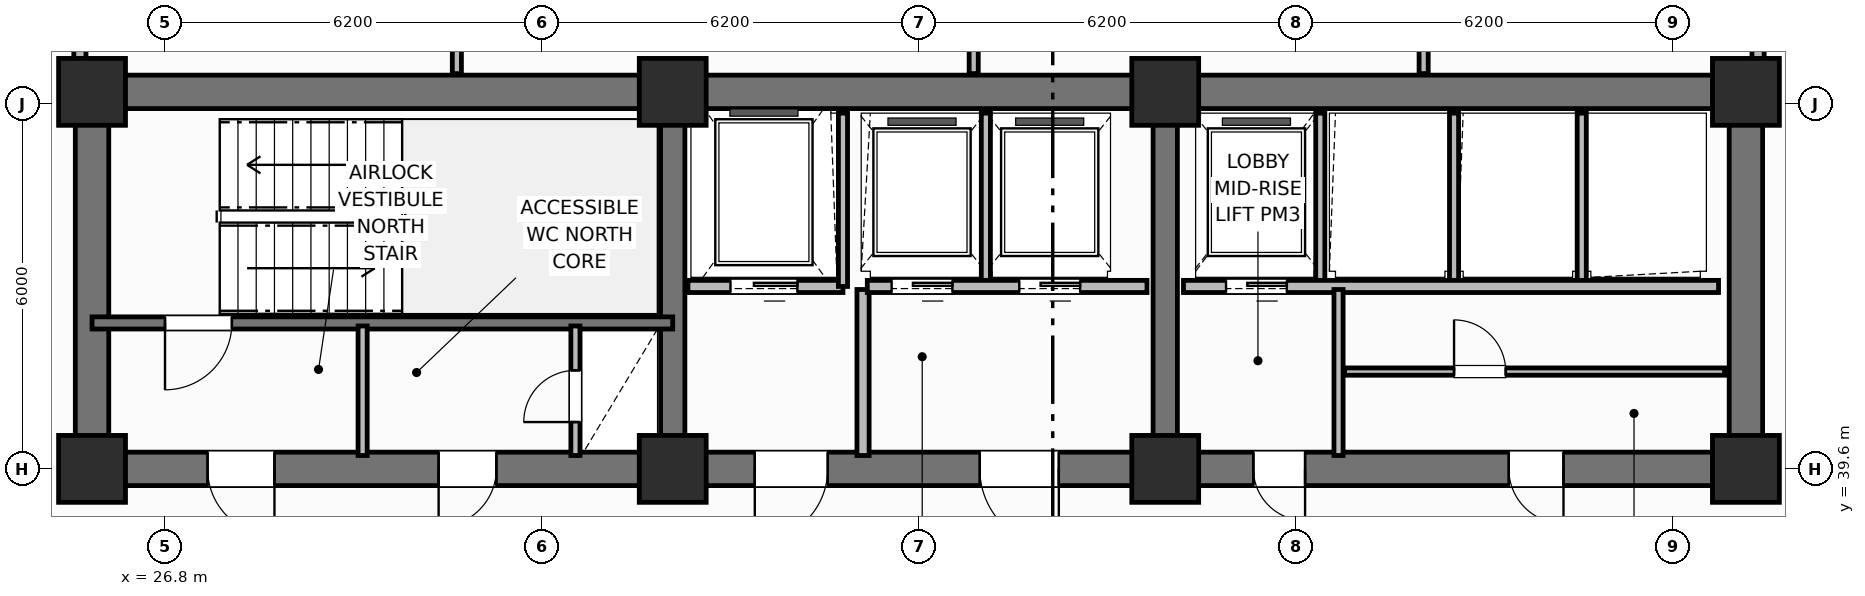
"""IFC4 building model, lengths in metres.
Left out: names, types, materials, properties, quantities, classifications, styles, units other than length and angle.
Written with IfcOpenShell. Run it as: python <this file> out.ifc"""

import sys

from ifc_helpers import new_model, si_unit, direction, frame, frame_2d, origin, origin_2d, place, context, subcontext, project, spatial, rectangle, extrude, element, fill, save


model = new_model("IFC4")
c1 = context("Model", 3, precision=1e-05, world=origin(), true_north=direction((0.0, 1.0)))
c2 = subcontext(c1, "Body", "Model", "MODEL_VIEW")
j1 = project(units=[si_unit("LENGTHUNIT", "METRE"), si_unit("PLANEANGLEUNIT", "RADIAN")], contexts=[c1])
p1 = place(None, origin())
s1 = spatial("IfcSite", under=j1, at=p1, CompositionType="ELEMENT")
p2 = place(p1, origin())
s2 = spatial("IfcBuilding", under=s1, at=p2, CompositionType="ELEMENT")
p3 = place(p2, frame((0.0, 0.0, 114.2)))
s3 = spatial("IfcBuildingStorey", under=s2, at=p3, CompositionType="ELEMENT", Elevation=114.2)
p4 = place(p3, frame((25.6, 45.8, 0.0), z_axis=(0.0, 0.0, 1.0), x_axis=(1.0, 0.0, 0.0)))
e1 = element("IfcWall", 1, at=p4, inside=s3, PredefinedType="SHEAR", context=c2, shape_type="SweptSolid", body=[
    extrude(rectangle(XDim=27.2, YDim=0.55, at=frame_2d((13.6, 0.0))), origin(), (0.0, 0.0, 1.0), 3.7),
])
for number, where, z_axis, x_axis in (
    (2, (25.6, 39.875, 0.0), (0.0, 0.0, 1.0), (0.0, 1.0, 0.0)),
    (3, (52.8, 39.875, 0.0), (0.0, 0.0, 1.0), (0.0, 1.0, 0.0)),
):
    element("IfcWall", number, at=place(p3, frame(where, z_axis=z_axis, x_axis=x_axis)), inside=s3, PredefinedType="SHEAR", context=c2, shape_type="SweptSolid", body=[
        extrude(rectangle(XDim=5.65, YDim=0.55, at=frame_2d((2.825, 0.0))), origin(), (0.0, 0.0, 1.0), 3.7),
    ])
p5 = place(p3, frame((52.8, 39.6, 0.0), z_axis=(0.0, 0.0, 1.0), x_axis=(-1.0, 0.0, 0.0)))
e4 = element("IfcWall", 4, at=p5, inside=s3, PredefinedType="SHEAR", context=c2, shape_type="SweptSolid", body=[
    extrude(rectangle(XDim=27.2, YDim=0.55, at=frame_2d((13.6, 0.0))), origin(), (0.0, 0.0, 1.0), 3.7),
])
p6 = place(p5, frame((24.2, 0.0, 0.0)))
e5 = element("IfcOpeningElement", 5, at=p6, cuts=e4, PredefinedType="OPENING", context=c2, shape_type="SweptSolid", body=[
    extrude(rectangle(XDim=1.1, YDim=2.15, at=frame_2d((0.55, 1.075))), frame((0.0, 0.285, 0.0), z_axis=(0.0, -1.0, 0.0), x_axis=(1.0, 0.0, 0.0)), (0.0, 0.0, 1.0), 0.57),
])
p7 = place(p5, frame((20.55, 0.0, 0.0)))
e6 = element("IfcOpeningElement", 6, at=p7, cuts=e4, PredefinedType="OPENING", context=c2, shape_type="SweptSolid", body=[
    extrude(rectangle(XDim=0.95, YDim=2.1, at=frame_2d((0.475, 1.05))), frame((0.0, 0.285, 0.0), z_axis=(0.0, -1.0, 0.0), x_axis=(1.0, 0.0, 0.0)), (0.0, 0.0, 1.0), 0.57),
])
p8 = place(p5, frame((15.1, 0.0, 0.0)))
e7 = element("IfcOpeningElement", 7, at=p8, cuts=e4, PredefinedType="OPENING", context=c2, shape_type="SweptSolid", body=[
    extrude(rectangle(XDim=1.2, YDim=2.15, at=frame_2d((0.6, 1.075))), frame((0.0, 0.285, 0.0), z_axis=(0.0, -1.0, 0.0), x_axis=(1.0, 0.0, 0.0)), (0.0, 0.0, 1.0), 0.57),
])
p9 = place(p5, frame((11.3, 0.0, 0.0)))
e8 = element("IfcOpeningElement", 8, at=p9, cuts=e4, PredefinedType="OPENING", context=c2, shape_type="SweptSolid", body=[
    extrude(rectangle(XDim=1.3, YDim=2.2, at=frame_2d((0.65, 1.1))), frame((0.0, 0.285, 0.0), z_axis=(0.0, -1.0, 0.0), x_axis=(1.0, 0.0, 0.0)), (0.0, 0.0, 1.0), 0.57),
])
p10 = place(p5, frame((7.25, 0.0, 0.0)))
e9 = element("IfcOpeningElement", 9, at=p10, cuts=e4, PredefinedType="OPENING", context=c2, shape_type="SweptSolid", body=[
    extrude(rectangle(XDim=0.85, YDim=2.1, at=frame_2d((0.425, 1.05))), frame((0.0, 0.285, 0.0), z_axis=(0.0, -1.0, 0.0), x_axis=(1.0, 0.0, 0.0)), (0.0, 0.0, 1.0), 0.57),
])
p11 = place(p5, frame((3.0, 0.0, 0.0)))
e10 = element("IfcOpeningElement", 10, at=p11, cuts=e4, PredefinedType="OPENING", context=c2, shape_type="SweptSolid", body=[
    extrude(rectangle(XDim=0.9, YDim=2.1, at=frame_2d((0.45, 1.05))), frame((0.0, 0.285, 0.0), z_axis=(0.0, -1.0, 0.0), x_axis=(1.0, 0.0, 0.0)), (0.0, 0.0, 1.0), 0.57),
])
for number, where, z_axis, x_axis in (
    (11, (35.15, 39.875, 0.0), (0.0, 0.0, 1.0), (0.0, 1.0, 0.0)),
    (12, (43.25, 39.875, 0.0), (0.0, 0.0, 1.0), (0.0, 1.0, 0.0)),
):
    element("IfcWall", number, at=place(p3, frame(where, z_axis=z_axis, x_axis=x_axis)), inside=s3, PredefinedType="SHEAR", context=c2, shape_type="SweptSolid", body=[
        extrude(rectangle(XDim=5.65, YDim=0.4, at=frame_2d((2.825, 0.0))), origin(), (0.0, 0.0, 1.0), 3.7),
    ])
for number, where, z_axis, x_axis in (
    (13, (25.6, 39.6, 0.0), (0.0, 0.0, 1.0), (1.0, 0.0, 0.0)),
    (14, (25.6, 45.8, 0.0), (0.0, 0.0, 1.0), (1.0, 0.0, 0.0)),
    (15, (35.15, 39.6, 0.0), (0.0, 0.0, 1.0), (1.0, 0.0, 0.0)),
    (16, (35.15, 45.8, 0.0), (0.0, 0.0, 1.0), (1.0, 0.0, 0.0)),
    (17, (43.25, 39.6, 0.0), (0.0, 0.0, 1.0), (1.0, 0.0, 0.0)),
    (18, (43.25, 45.8, 0.0), (0.0, 0.0, 1.0), (1.0, 0.0, 0.0)),
    (19, (52.8, 39.6, 0.0), (0.0, 0.0, 1.0), (1.0, 0.0, 0.0)),
    (20, (52.8, 45.8, 0.0), (0.0, 0.0, 1.0), (1.0, 0.0, 0.0)),
):
    element("IfcColumn", number, at=place(p3, frame(where, z_axis=z_axis, x_axis=x_axis)), inside=s3, PredefinedType="COLUMN", context=c2, shape_type="SweptSolid", body=[
        extrude(rectangle(XDim=1.1, YDim=1.1, at=origin_2d()), origin(), (0.0, 0.0, 1.0), 3.7),
    ])
p12 = place(p3, frame((35.15, 42.0, 0.0), z_axis=(0.0, 0.0, 1.0), x_axis=(-1.0, 0.0, 0.0)))
e21 = element("IfcWall", 21, at=p12, inside=s3, PredefinedType="SHEAR", context=c2, shape_type="SweptSolid", body=[
    extrude(rectangle(XDim=9.55, YDim=0.2, at=frame_2d((4.775, 0.0))), origin(), (0.0, 0.0, 1.0), 3.7),
])
p13 = place(p12, frame((7.25, 0.0, 0.0)))
e22 = element("IfcOpeningElement", 22, at=p13, cuts=e21, PredefinedType="OPENING", context=c2, shape_type="SweptSolid", body=[
    extrude(rectangle(XDim=1.1, YDim=2.15, at=frame_2d((0.55, 1.075))), frame((0.0, 0.11, 0.0), z_axis=(0.0, -1.0, 0.0), x_axis=(1.0, 0.0, 0.0)), (0.0, 0.0, 1.0), 0.22),
])
p14 = place(p3, frame((33.55, 39.82, 0.0), z_axis=(0.0, 0.0, 1.0), x_axis=(0.0, 1.0, 0.0)))
e23 = element("IfcWall", 23, at=p14, inside=s3, PredefinedType="PARTITIONING", context=c2, shape_type="SweptSolid", body=[
    extrude(rectangle(XDim=2.13, YDim=0.15, at=frame_2d((1.065, 0.0))), origin(), (0.0, 0.0, 1.0), 2.53),
])
p15 = place(p14, frame((0.55, 0.0, 0.0)))
e24 = element("IfcOpeningElement", 24, at=p15, cuts=e23, PredefinedType="OPENING", context=c2, shape_type="SweptSolid", body=[
    extrude(rectangle(XDim=0.85, YDim=2.05, at=frame_2d((0.425, 1.025))), frame((0.0, 0.085, 0.0), z_axis=(0.0, -1.0, 0.0), x_axis=(1.0, 0.0, 0.0)), (0.0, 0.0, 1.0), 0.17),
])
p16 = place(p3, frame((30.05, 39.82, 0.0), z_axis=(0.0, 0.0, 1.0), x_axis=(0.0, 1.0, 0.0)))
e25 = element("IfcWall", 25, at=p16, inside=s3, PredefinedType="PARTITIONING", context=c2, shape_type="SweptSolid", body=[
    extrude(rectangle(XDim=2.13, YDim=0.15, at=frame_2d((1.065, 0.0))), origin(), (0.0, 0.0, 1.0), 2.53),
])
p17 = place(p3, frame((37.95, 42.6, 0.0), z_axis=(0.0, 0.0, 1.0), x_axis=(-1.0, 0.0, 0.0)))
e26 = element("IfcWall", 26, at=p17, inside=s3, PredefinedType="PARTITIONING", context=c2, shape_type="SweptSolid", body=[
    extrude(rectangle(XDim=2.55, YDim=0.2, at=frame_2d((1.275, 0.0))), origin(), (0.0, 0.0, 1.0), 2.3),
])
p18 = place(p17, frame((0.75, 0.0, 0.0)))
e27 = element("IfcOpeningElement", 27, at=p18, cuts=e26, PredefinedType="OPENING", context=c2, shape_type="SweptSolid", body=[
    extrude(rectangle(XDim=1.1, YDim=2.15, at=frame_2d((0.55, 1.075))), frame((0.0, 0.11, 0.0), z_axis=(0.0, -1.0, 0.0), x_axis=(1.0, 0.0, 0.0)), (0.0, 0.0, 1.0), 0.22),
])
p19 = place(p3, frame((37.95, 42.6, 0.0), z_axis=(0.0, 0.0, 1.0), x_axis=(0.0, 1.0, 0.0)))
e28 = element("IfcWall", 28, at=p19, inside=s3, PredefinedType="PARTITIONING", context=c2, shape_type="SweptSolid", body=[
    extrude(rectangle(XDim=2.85, YDim=0.15, at=frame_2d((1.425, 0.0))), origin(), (0.0, 0.0, 1.0), 2.53),
])
p20 = place(p3, frame((38.28, 39.82, 0.0), z_axis=(0.0, 0.0, 1.0), x_axis=(0.0, 1.0, 0.0)))
e29 = element("IfcWall", 29, at=p20, inside=s3, PredefinedType="PARTITIONING", context=c2, shape_type="SweptSolid", body=[
    extrude(rectangle(XDim=2.73, YDim=0.2, at=frame_2d((1.365, 0.0))), origin(), (0.0, 0.0, 1.0), 2.53),
])
p21 = place(p3, frame((40.3, 42.65, 0.0), z_axis=(0.0, 0.0, 1.0), x_axis=(0.0, 1.0, 0.0)))
e30 = element("IfcWall", 30, at=p21, inside=s3, PredefinedType="PARTITIONING", context=c2, shape_type="SweptSolid", body=[
    extrude(rectangle(XDim=2.8, YDim=0.15, at=frame_2d((1.4, 0.0))), origin(), (0.0, 0.0, 1.0), 2.53),
])
p22 = place(p3, frame((42.95, 42.6, 0.0), z_axis=(0.0, 0.0, 1.0), x_axis=(-1.0, 0.0, 0.0)))
e31 = element("IfcWall", 31, at=p22, inside=s3, PredefinedType="PARTITIONING", context=c2, shape_type="SweptSolid", body=[
    extrude(rectangle(XDim=4.6, YDim=0.2, at=frame_2d((2.3, 0.0))), origin(), (0.0, 0.0, 1.0), 2.3),
])
p23 = place(p22, frame((3.2, 0.0, 0.0)))
e32 = element("IfcOpeningElement", 32, at=p23, cuts=e31, PredefinedType="OPENING", context=c2, shape_type="SweptSolid", body=[
    extrude(rectangle(XDim=1.0, YDim=2.15, at=frame_2d((0.5, 1.075))), frame((0.0, 0.11, 0.0), z_axis=(0.0, -1.0, 0.0), x_axis=(1.0, 0.0, 0.0)), (0.0, 0.0, 1.0), 0.22),
])
p24 = place(p22, frame((1.1, 0.0, 0.0)))
e33 = element("IfcOpeningElement", 33, at=p24, cuts=e31, PredefinedType="OPENING", context=c2, shape_type="SweptSolid", body=[
    extrude(rectangle(XDim=1.0, YDim=2.15, at=frame_2d((0.5, 1.075))), frame((0.0, 0.11, 0.0), z_axis=(0.0, -1.0, 0.0), x_axis=(1.0, 0.0, 0.0)), (0.0, 0.0, 1.0), 0.22),
])
for number, where, z_axis, x_axis in (
    (34, (45.8, 42.65, 0.0), (0.0, 0.0, 1.0), (0.0, 1.0, 0.0)),
    (35, (48.0, 42.65, 0.0), (0.0, 0.0, 1.0), (0.0, 1.0, 0.0)),
    (36, (50.1, 42.65, 0.0), (0.0, 0.0, 1.0), (0.0, 1.0, 0.0)),
):
    element("IfcWall", number, at=place(p3, frame(where, z_axis=z_axis, x_axis=x_axis)), inside=s3, PredefinedType="PARTITIONING", context=c2, shape_type="SweptSolid", body=[
        extrude(rectangle(XDim=2.8, YDim=0.15, at=frame_2d((1.4, 0.0))), origin(), (0.0, 0.0, 1.0), 2.53),
    ])
p25 = place(p3, frame((52.35, 42.6, 0.0), z_axis=(0.0, 0.0, 1.0), x_axis=(-1.0, 0.0, 0.0)))
e37 = element("IfcWall", 37, at=p25, inside=s3, PredefinedType="PARTITIONING", context=c2, shape_type="SweptSolid", body=[
    extrude(rectangle(XDim=8.8, YDim=0.2, at=frame_2d((4.4, 0.0))), origin(), (0.0, 0.0, 1.0), 2.53),
])
p26 = place(p25, frame((7.1, 0.0, 0.0)))
e38 = element("IfcOpeningElement", 38, at=p26, cuts=e37, PredefinedType="OPENING", context=c2, shape_type="SweptSolid", body=[
    extrude(rectangle(XDim=1.0, YDim=2.15, at=frame_2d((0.5, 1.075))), frame((0.0, 0.11, 0.0), z_axis=(0.0, -1.0, 0.0), x_axis=(1.0, 0.0, 0.0)), (0.0, 0.0, 1.0), 0.22),
])
p27 = place(p3, frame((46.1, 39.82, 0.0), z_axis=(0.0, 0.0, 1.0), x_axis=(0.0, 1.0, 0.0)))
e39 = element("IfcWall", 39, at=p27, inside=s3, PredefinedType="PARTITIONING", context=c2, shape_type="SweptSolid", body=[
    extrude(rectangle(XDim=2.73, YDim=0.15, at=frame_2d((1.365, 0.0))), origin(), (0.0, 0.0, 1.0), 2.53),
])
p28 = place(p3, frame((46.2, 41.2, 0.0), z_axis=(0.0, 0.0, 1.0), x_axis=(1.0, 0.0, 0.0)))
e40 = element("IfcWall", 40, at=p28, inside=s3, PredefinedType="PARTITIONING", context=c2, shape_type="SweptSolid", body=[
    extrude(rectangle(XDim=6.25, YDim=0.12, at=frame_2d((3.125, 0.0))), origin(), (0.0, 0.0, 1.0), 2.53),
])
p29 = place(p28, frame((1.8, 0.0, 0.0)))
e41 = element("IfcOpeningElement", 41, at=p29, cuts=e40, PredefinedType="OPENING", context=c2, shape_type="SweptSolid", body=[
    extrude(rectangle(XDim=0.85, YDim=2.1, at=frame_2d((0.425, 1.05))), frame((0.0, 0.07, 0.0), z_axis=(0.0, -1.0, 0.0), x_axis=(1.0, 0.0, 0.0)), (0.0, 0.0, 1.0), 0.14),
])
p30 = place(p3, frame((31.6, 46.1, 0.0), z_axis=(0.0, 0.0, 1.0), x_axis=(0.0, 1.0, 0.0)))
e42 = element("IfcWall", 42, at=p30, inside=s3, PredefinedType="PARTITIONING", context=c2, shape_type="SweptSolid", body=[
    extrude(rectangle(XDim=5.33, YDim=0.15, at=frame_2d((2.665, 0.0))), origin(), (0.0, 0.0, 1.0), 2.53),
])
p31 = place(p30, frame((0.85, 0.0, 0.0)))
e43 = element("IfcOpeningElement", 43, at=p31, cuts=e42, PredefinedType="OPENING", context=c2, shape_type="SweptSolid", body=[
    extrude(rectangle(XDim=0.9, YDim=2.1, at=frame_2d((0.45, 1.05))), frame((0.0, 0.085, 0.0), z_axis=(0.0, -1.0, 0.0), x_axis=(1.0, 0.0, 0.0)), (0.0, 0.0, 1.0), 0.17),
])
p32 = place(p3, frame((40.1, 46.1, 0.0), z_axis=(0.0, 0.0, 1.0), x_axis=(0.0, 1.0, 0.0)))
e44 = element("IfcWall", 44, at=p32, inside=s3, PredefinedType="PARTITIONING", context=c2, shape_type="SweptSolid", body=[
    extrude(rectangle(XDim=5.33, YDim=0.15, at=frame_2d((2.665, 0.0))), origin(), (0.0, 0.0, 1.0), 2.53),
])
p33 = place(p3, frame((47.5, 46.1, 0.0), z_axis=(0.0, 0.0, 1.0), x_axis=(0.0, 1.0, 0.0)))
e45 = element("IfcWall", 45, at=p33, inside=s3, PredefinedType="PARTITIONING", context=c2, shape_type="SweptSolid", body=[
    extrude(rectangle(XDim=5.33, YDim=0.15, at=frame_2d((2.665, 0.0))), origin(), (0.0, 0.0, 1.0), 2.53),
])
p34 = place(p33, frame((0.85, 0.0, 0.0)))
e46 = element("IfcOpeningElement", 46, at=p34, cuts=e45, PredefinedType="OPENING", context=c2, shape_type="SweptSolid", body=[
    extrude(rectangle(XDim=0.9, YDim=2.1, at=frame_2d((0.45, 1.05))), frame((0.0, 0.085, 0.0), z_axis=(0.0, -1.0, 0.0), x_axis=(1.0, 0.0, 0.0)), (0.0, 0.0, 1.0), 0.17),
])
p35 = place(p3, frame((25.4, 46.1, 0.0), z_axis=(0.0, 0.0, 1.0), x_axis=(0.0, 1.0, 0.0)))
e47 = element("IfcWall", 47, at=p35, inside=s3, PredefinedType="PARTITIONING", context=c2, shape_type="SweptSolid", body=[
    extrude(rectangle(XDim=3.98, YDim=0.2, at=frame_2d((1.99, 0.0))), origin(), (0.0, 0.0, 1.0), 2.53),
])
p36 = place(p35, frame((1.05, 0.0, 0.0)))
e48 = element("IfcOpeningElement", 48, at=p36, cuts=e47, PredefinedType="OPENING", context=c2, shape_type="SweptSolid", body=[
    extrude(rectangle(XDim=0.9, YDim=2.1, at=frame_2d((0.45, 1.05))), frame((0.0, 0.11, 0.0), z_axis=(0.0, -1.0, 0.0), x_axis=(1.0, 0.0, 0.0)), (0.0, 0.0, 1.0), 0.22),
])
p37 = place(p3, frame((53.0, 46.1, 0.0), z_axis=(0.0, 0.0, 1.0), x_axis=(0.0, 1.0, 0.0)))
e49 = element("IfcWall", 49, at=p37, inside=s3, PredefinedType="PARTITIONING", context=c2, shape_type="SweptSolid", body=[
    extrude(rectangle(XDim=3.98, YDim=0.2, at=frame_2d((1.99, 0.0))), origin(), (0.0, 0.0, 1.0), 2.53),
])
p38 = place(p37, frame((1.05, 0.0, 0.0)))
e50 = element("IfcOpeningElement", 50, at=p38, cuts=e49, PredefinedType="OPENING", context=c2, shape_type="SweptSolid", body=[
    extrude(rectangle(XDim=0.9, YDim=2.1, at=frame_2d((0.45, 1.05))), frame((0.0, 0.11, 0.0), z_axis=(0.0, -1.0, 0.0), x_axis=(1.0, 0.0, 0.0)), (0.0, 0.0, 1.0), 0.22),
])
p39 = place(p13, origin())
e51 = element("IfcDoor", 51, at=p39, inside=s3, OperationType="SINGLE_SWING_RIGHT", PredefinedType="DOOR", context=c2, shape_type="SweptSolid", body=[
    extrude(rectangle(XDim=1.1, YDim=2.15, at=frame_2d((0.55, 1.075))), frame((0.0, 0.025, 0.0), z_axis=(0.0, -1.0, 0.0), x_axis=(1.0, 0.0, 0.0)), (0.0, 0.0, 1.0), 0.05),
])
fill(e22, e51)
p40 = place(p15, origin())
e52 = element("IfcDoor", 52, at=p40, inside=s3, OperationType="SINGLE_SWING_LEFT", PredefinedType="TRAPDOOR", context=c2, shape_type="SweptSolid", body=[
    extrude(rectangle(XDim=0.85, YDim=2.05, at=frame_2d((0.425, 1.025))), frame((0.0, 0.025, 0.0), z_axis=(0.0, -1.0, 0.0), x_axis=(1.0, 0.0, 0.0)), (0.0, 0.0, 1.0), 0.05),
])
fill(e24, e52)
p41 = place(p18, origin())
e53 = element("IfcDoor", 53, at=p41, inside=s3, OperationType="SLIDING_TO_LEFT", PredefinedType="DOOR", context=c2, shape_type="SweptSolid", body=[
    extrude(rectangle(XDim=1.1, YDim=2.15, at=frame_2d((0.55, 1.075))), frame((0.0, 0.025, 0.0), z_axis=(0.0, -1.0, 0.0), x_axis=(1.0, 0.0, 0.0)), (0.0, 0.0, 1.0), 0.05),
])
fill(e27, e53)
p42 = place(p23, origin())
e54 = element("IfcDoor", 54, at=p42, inside=s3, OperationType="SLIDING_TO_LEFT", PredefinedType="DOOR", context=c2, shape_type="SweptSolid", body=[
    extrude(rectangle(XDim=1.0, YDim=2.15, at=frame_2d((0.5, 1.075))), frame((0.0, 0.025, 0.0), z_axis=(0.0, -1.0, 0.0), x_axis=(1.0, 0.0, 0.0)), (0.0, 0.0, 1.0), 0.05),
])
fill(e32, e54)
p43 = place(p24, origin())
e55 = element("IfcDoor", 55, at=p43, inside=s3, OperationType="SLIDING_TO_LEFT", PredefinedType="DOOR", context=c2, shape_type="SweptSolid", body=[
    extrude(rectangle(XDim=1.0, YDim=2.15, at=frame_2d((0.5, 1.075))), frame((0.0, 0.025, 0.0), z_axis=(0.0, -1.0, 0.0), x_axis=(1.0, 0.0, 0.0)), (0.0, 0.0, 1.0), 0.05),
])
fill(e33, e55)
p44 = place(p26, origin())
e56 = element("IfcDoor", 56, at=p44, inside=s3, OperationType="SLIDING_TO_LEFT", PredefinedType="DOOR", context=c2, shape_type="SweptSolid", body=[
    extrude(rectangle(XDim=1.0, YDim=2.15, at=frame_2d((0.5, 1.075))), frame((0.0, 0.025, 0.0), z_axis=(0.0, -1.0, 0.0), x_axis=(1.0, 0.0, 0.0)), (0.0, 0.0, 1.0), 0.05),
])
fill(e38, e56)
p45 = place(p29, origin())
e57 = element("IfcDoor", 57, at=p45, inside=s3, OperationType="SINGLE_SWING_LEFT", PredefinedType="DOOR", context=c2, shape_type="SweptSolid", body=[
    extrude(rectangle(XDim=0.85, YDim=2.1, at=frame_2d((0.425, 1.05))), frame((0.0, 0.025, 0.0), z_axis=(0.0, -1.0, 0.0), x_axis=(1.0, 0.0, 0.0)), (0.0, 0.0, 1.0), 0.05),
])
fill(e41, e57)
p46 = place(p6, origin())
e58 = element("IfcDoor", 58, at=p46, inside=s3, OperationType="SINGLE_SWING_LEFT", PredefinedType="DOOR", context=c2, shape_type="SweptSolid", body=[
    extrude(rectangle(XDim=1.1, YDim=2.15, at=frame_2d((0.55, 1.075))), frame((0.0, 0.025, 0.0), z_axis=(0.0, -1.0, 0.0), x_axis=(1.0, 0.0, 0.0)), (0.0, 0.0, 1.0), 0.05),
])
fill(e5, e58)
p47 = place(p7, origin())
e59 = element("IfcDoor", 59, at=p47, inside=s3, OperationType="SINGLE_SWING_RIGHT", PredefinedType="DOOR", context=c2, shape_type="SweptSolid", body=[
    extrude(rectangle(XDim=0.95, YDim=2.1, at=frame_2d((0.475, 1.05))), frame((0.0, 0.025, 0.0), z_axis=(0.0, -1.0, 0.0), x_axis=(1.0, 0.0, 0.0)), (0.0, 0.0, 1.0), 0.05),
])
fill(e6, e59)
p48 = place(p8, origin())
e60 = element("IfcDoor", 60, at=p48, inside=s3, OperationType="SINGLE_SWING_RIGHT", PredefinedType="DOOR", context=c2, shape_type="SweptSolid", body=[
    extrude(rectangle(XDim=1.2, YDim=2.15, at=frame_2d((0.6, 1.075))), frame((0.0, 0.025, 0.0), z_axis=(0.0, -1.0, 0.0), x_axis=(1.0, 0.0, 0.0)), (0.0, 0.0, 1.0), 0.05),
])
fill(e7, e60)
p49 = place(p9, origin())
e61 = element("IfcDoor", 61, at=p49, inside=s3, OperationType="SINGLE_SWING_LEFT", PredefinedType="DOOR", context=c2, shape_type="SweptSolid", body=[
    extrude(rectangle(XDim=1.3, YDim=2.2, at=frame_2d((0.65, 1.1))), frame((0.0, 0.025, 0.0), z_axis=(0.0, -1.0, 0.0), x_axis=(1.0, 0.0, 0.0)), (0.0, 0.0, 1.0), 0.05),
])
fill(e8, e61)
p50 = place(p10, origin())
e62 = element("IfcDoor", 62, at=p50, inside=s3, OperationType="SINGLE_SWING_LEFT", PredefinedType="DOOR", context=c2, shape_type="SweptSolid", body=[
    extrude(rectangle(XDim=0.85, YDim=2.1, at=frame_2d((0.425, 1.05))), frame((0.0, 0.025, 0.0), z_axis=(0.0, -1.0, 0.0), x_axis=(1.0, 0.0, 0.0)), (0.0, 0.0, 1.0), 0.05),
])
fill(e9, e62)
p51 = place(p11, origin())
e63 = element("IfcDoor", 63, at=p51, inside=s3, OperationType="SINGLE_SWING_LEFT", PredefinedType="DOOR", context=c2, shape_type="SweptSolid", body=[
    extrude(rectangle(XDim=0.9, YDim=2.1, at=frame_2d((0.45, 1.05))), frame((0.0, 0.025, 0.0), z_axis=(0.0, -1.0, 0.0), x_axis=(1.0, 0.0, 0.0)), (0.0, 0.0, 1.0), 0.05),
])
fill(e10, e63)
save(model, sys.argv[1])
